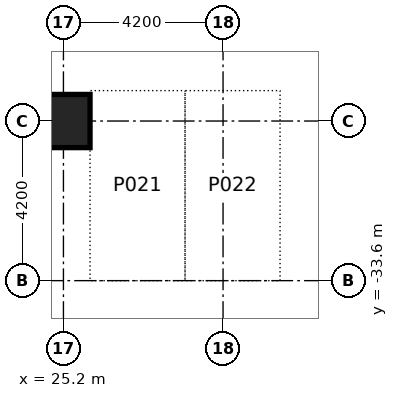
"""IFC4 building model, lengths in metres.
Left out: names, types, materials, properties, quantities, classifications, styles, units other than length and angle.
Written with IfcOpenShell. Run it as: python <this file> out.ifc"""

import sys

from ifc_helpers import new_model, si_unit, direction, frame, origin, origin_2d, place, context, subcontext, project, spatial, rectangle, extrude, element, save


model = new_model("IFC4")
c1 = context("Model", 3, precision=1e-05, world=origin(), true_north=direction((0.0, 1.0)))
c2 = subcontext(c1, "Body", "Model", "MODEL_VIEW")
j1 = project(units=[si_unit("LENGTHUNIT", "METRE"), si_unit("PLANEANGLEUNIT", "RADIAN")], contexts=[c1])
p1 = place(None, origin())
s1 = spatial("IfcSite", under=j1, at=p1, CompositionType="ELEMENT")
p2 = place(p1, origin())
s2 = spatial("IfcBuilding", under=s1, at=p2, CompositionType="ELEMENT")
p3 = place(p2, frame((0.0, 0.0, -8.4)))
s3 = spatial("IfcBuildingStorey", under=s2, at=p3, CompositionType="ELEMENT", Elevation=-8.4)
p4 = place(p3, frame((25.2, -29.4, -0.5), z_axis=(0.0, 0.0, 1.0), x_axis=(1.0, 0.0, 0.0)))
e1 = element("IfcColumn", 1, at=p4, inside=s3, PredefinedType="COLUMN", context=c2, shape_type="SweptSolid", body=[
    extrude(rectangle(XDim=1.4, YDim=1.4, at=origin_2d()), origin(), (0.0, 0.0, 1.0), 4.7),
])
save(model, sys.argv[1])
